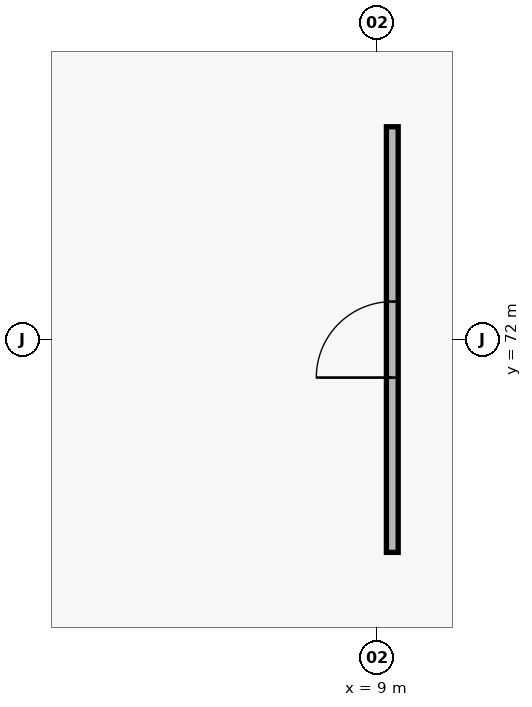
"""IFC4 building model, lengths in metres.
Left out: names, types, materials, properties, quantities, classifications, styles, units other than length and angle.
Written with IfcOpenShell. Run it as: python <this file> out.ifc"""

import sys

from ifc_helpers import new_model, si_unit, direction, frame, frame_2d, origin, place, context, subcontext, project, spatial, rectangle, extrude, element, fill, save


model = new_model("IFC4")
c1 = context("Model", 3, precision=1e-05, world=origin(), true_north=direction((0.0, 1.0)))
c2 = subcontext(c1, "Body", "Model", "MODEL_VIEW")
j1 = project(units=[si_unit("LENGTHUNIT", "METRE"), si_unit("PLANEANGLEUNIT", "RADIAN")], contexts=[c1])
p1 = place(None, origin())
s1 = spatial("IfcSite", under=j1, at=p1, CompositionType="ELEMENT")
p2 = place(p1, origin())
s2 = spatial("IfcBuilding", under=s1, at=p2, CompositionType="ELEMENT")
p3 = place(p2, origin())
s3 = spatial("IfcBuildingStorey", under=s2, at=p3, CompositionType="ELEMENT", Elevation=0.0)
p4 = place(p3, frame((9.2, 69.2, 0.0), z_axis=(0.0, 0.0, 1.0), x_axis=(0.0, 1.0, 0.0)))
e1 = element("IfcWall", 1, at=p4, inside=s3, PredefinedType="PARTITIONING", context=c2, shape_type="SweptSolid", body=[
    extrude(rectangle(XDim=5.6, YDim=0.155, at=frame_2d((2.8, 0.0))), origin(), (0.0, 0.0, 1.0), 4.3),
])
p5 = place(p4, frame((2.3, 0.0, 0.0)))
e2 = element("IfcOpeningElement", 2, at=p5, cuts=e1, PredefinedType="OPENING", context=c2, shape_type="SweptSolid", body=[
    extrude(rectangle(XDim=1.0, YDim=2.1, at=frame_2d((0.5, 1.05))), frame((0.0, 0.087, 0.0), z_axis=(0.0, -1.0, 0.0), x_axis=(1.0, 0.0, 0.0)), (0.0, 0.0, 1.0), 0.175),
])
p6 = place(p5, origin())
e3 = element("IfcDoor", 3, at=p6, inside=s3, OperationType="SINGLE_SWING_LEFT", PredefinedType="DOOR", context=c2, shape_type="SweptSolid", body=[
    extrude(rectangle(XDim=1.0, YDim=2.1, at=frame_2d((0.5, 1.05))), frame((0.0, 0.025, 0.0), z_axis=(0.0, -1.0, 0.0), x_axis=(1.0, 0.0, 0.0)), (0.0, 0.0, 1.0), 0.05),
])
fill(e2, e3)
save(model, sys.argv[1])
